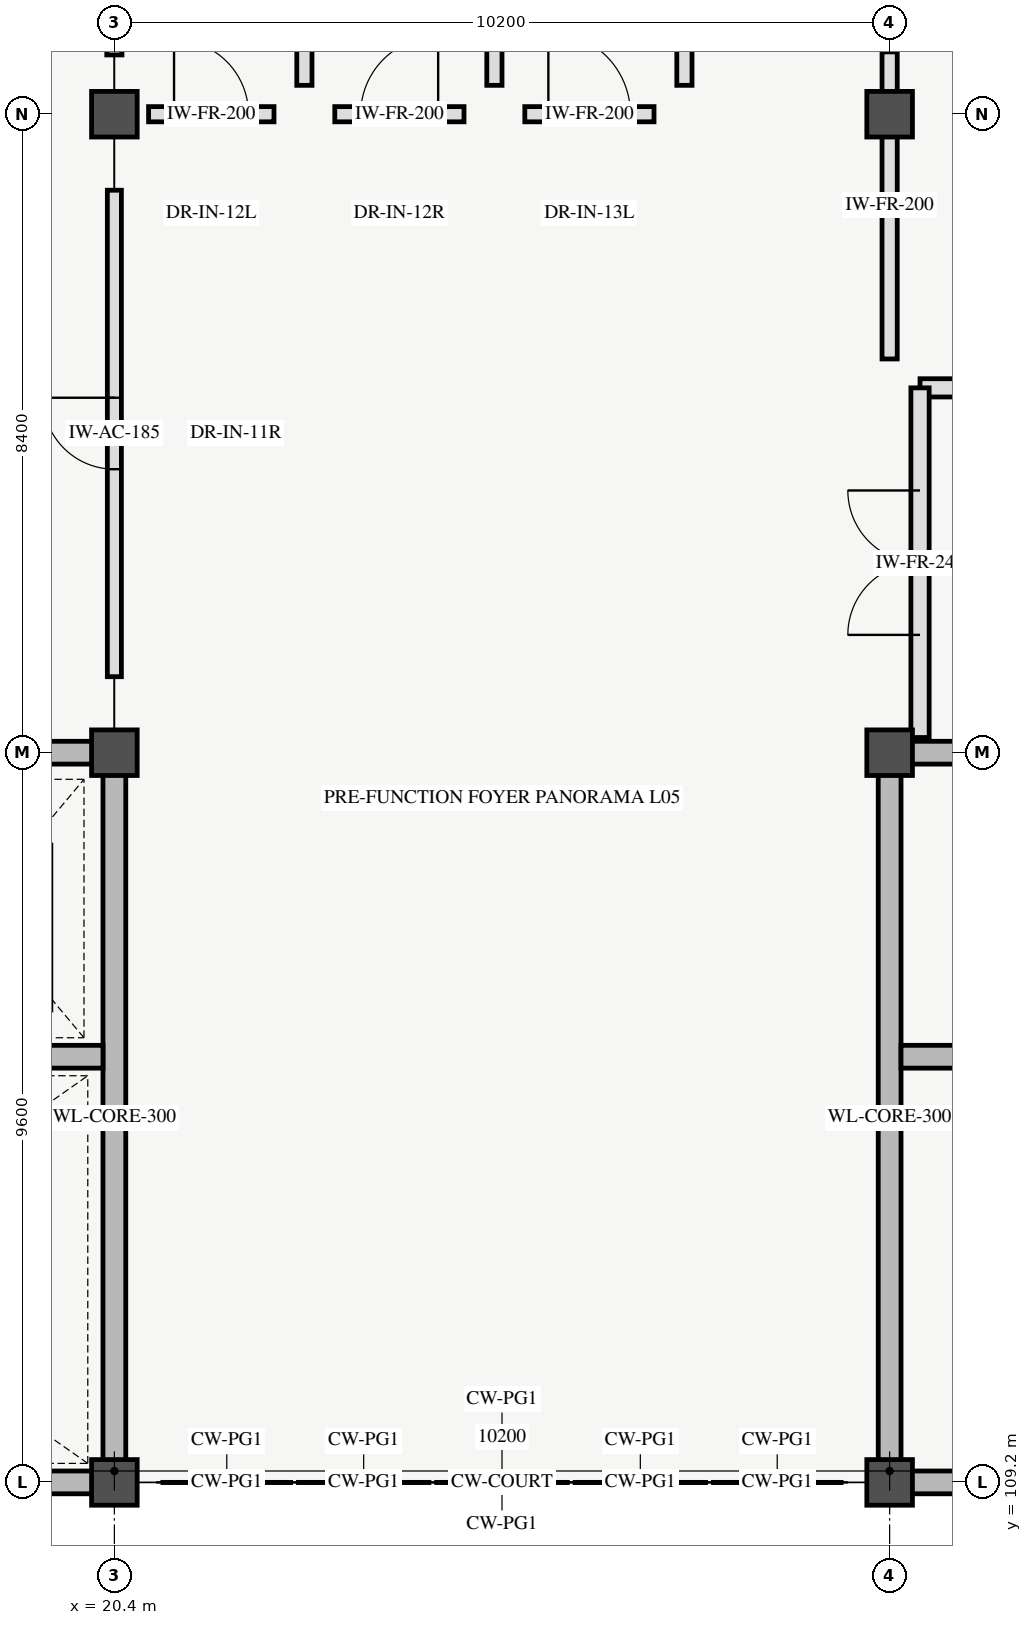
"""IFC4 building model, lengths in metres.
Left out: names, types, materials, properties, quantities, classifications, styles, units other than length and angle.
Written with IfcOpenShell. Run it as: python <this file> out.ifc"""

import sys

from ifc_helpers import new_model, si_unit, direction, frame, frame_2d, origin, origin_2d, place, context, subcontext, project, spatial, rectangle, extrude, element, fill, save


model = new_model("IFC4")
c1 = context("Model", 3, precision=1e-05, world=origin(), true_north=direction((0.0, 1.0)))
c2 = subcontext(c1, "Body", "Model", "MODEL_VIEW")
j1 = project(units=[si_unit("LENGTHUNIT", "METRE"), si_unit("PLANEANGLEUNIT", "RADIAN")], contexts=[c1])
p1 = place(None, origin())
s1 = spatial("IfcSite", under=j1, at=p1, CompositionType="ELEMENT")
p2 = place(p1, origin())
s2 = spatial("IfcBuilding", under=s1, at=p2, CompositionType="ELEMENT")
p3 = place(p2, frame((0.0, 0.0, 23.4)))
s3 = spatial("IfcBuildingStorey", under=s2, at=p3, CompositionType="ELEMENT", Elevation=23.4)
for number, where, z_axis, x_axis in (
    (1, (20.4, 109.2, 0.0), (0.0, 0.0, 1.0), (1.0, 0.0, 0.0)),
    (2, (20.4, 118.8, 0.0), (0.0, 0.0, 1.0), (1.0, 0.0, 0.0)),
    (3, (20.4, 127.2, 0.0), (0.0, 0.0, 1.0), (1.0, 0.0, 0.0)),
    (4, (30.6, 109.2, 0.0), (0.0, 0.0, 1.0), (1.0, 0.0, 0.0)),
    (5, (30.6, 118.8, 0.0), (0.0, 0.0, 1.0), (1.0, 0.0, 0.0)),
    (6, (30.6, 127.2, 0.0), (0.0, 0.0, 1.0), (1.0, 0.0, 0.0)),
):
    element("IfcColumn", number, at=place(p3, frame(where, z_axis=z_axis, x_axis=x_axis)), inside=s3, PredefinedType="COLUMN", context=c2, shape_type="SweptSolid", body=[
        extrude(rectangle(XDim=0.6, YDim=0.6, at=origin_2d()), origin(), (0.0, 0.0, 1.0), 4.2),
    ])
p4 = place(p3, frame((10.2, 109.2, 0.0), z_axis=(0.0, 0.0, 1.0), x_axis=(1.0, 0.0, 0.0)))
e7 = element("IfcWall", 7, at=p4, inside=s3, PredefinedType="SHEAR", context=c2, shape_type="SweptSolid", body=[
    extrude(rectangle(XDim=10.2, YDim=0.3, at=frame_2d((5.1, 0.0))), origin(), (0.0, 0.0, 1.0), 4.2),
])
p5 = place(p3, frame((10.2, 118.8, 0.0), z_axis=(0.0, 0.0, 1.0), x_axis=(1.0, 0.0, 0.0)))
e8 = element("IfcWall", 8, at=p5, inside=s3, PredefinedType="SHEAR", context=c2, shape_type="SweptSolid", body=[
    extrude(rectangle(XDim=10.2, YDim=0.3, at=frame_2d((5.1, 0.0))), origin(), (0.0, 0.0, 1.0), 4.2),
])
p6 = place(p5, frame((1.2, 0.0, 0.0)))
e9 = element("IfcOpeningElement", 9, at=p6, cuts=e8, PredefinedType="OPENING", context=c2, shape_type="SweptSolid", body=[
    extrude(rectangle(XDim=1.16, YDim=2.2, at=frame_2d((0.58, 1.1))), frame((0.0, 0.16, 0.0), z_axis=(0.0, -1.0, 0.0), x_axis=(1.0, 0.0, 0.0)), (0.0, 0.0, 1.0), 0.32),
])
p7 = place(p5, frame((7.4, 0.0, 0.0)))
e10 = element("IfcOpeningElement", 10, at=p7, cuts=e8, PredefinedType="OPENING", context=c2, shape_type="SweptSolid", body=[
    extrude(rectangle(XDim=1.1, YDim=2.2, at=frame_2d((0.55, 1.1))), frame((0.0, 0.16, 0.0), z_axis=(0.0, -1.0, 0.0), x_axis=(1.0, 0.0, 0.0)), (0.0, 0.0, 1.0), 0.32),
])
p8 = place(p3, frame((20.4, 109.2, 0.0), z_axis=(0.0, 0.0, 1.0), x_axis=(0.0, 1.0, 0.0)))
e11 = element("IfcWall", 11, at=p8, inside=s3, PredefinedType="SHEAR", context=c2, shape_type="SweptSolid", body=[
    extrude(rectangle(XDim=9.6, YDim=0.3, at=frame_2d((4.8, 0.0))), origin(), (0.0, 0.0, 1.0), 4.2),
])
p9 = place(p3, frame((30.6, 109.2, 0.0), z_axis=(0.0, 0.0, 1.0), x_axis=(1.0, 0.0, 0.0)))
e12 = element("IfcWall", 12, at=p9, inside=s3, PredefinedType="SHEAR", context=c2, shape_type="SweptSolid", body=[
    extrude(rectangle(XDim=10.2, YDim=0.3, at=frame_2d((5.1, 0.0))), origin(), (0.0, 0.0, 1.0), 4.2),
])
p10 = place(p3, frame((30.6, 118.8, 0.0), z_axis=(0.0, 0.0, 1.0), x_axis=(1.0, 0.0, 0.0)))
e13 = element("IfcWall", 13, at=p10, inside=s3, PredefinedType="SHEAR", context=c2, shape_type="SweptSolid", body=[
    extrude(rectangle(XDim=10.2, YDim=0.3, at=frame_2d((5.1, 0.0))), origin(), (0.0, 0.0, 1.0), 4.2),
])
p11 = place(p10, frame((1.2, 0.0, 0.0)))
e14 = element("IfcOpeningElement", 14, at=p11, cuts=e13, PredefinedType="OPENING", context=c2, shape_type="SweptSolid", body=[
    extrude(rectangle(XDim=1.16, YDim=2.2, at=frame_2d((0.58, 1.1))), frame((0.0, 0.16, 0.0), z_axis=(0.0, -1.0, 0.0), x_axis=(1.0, 0.0, 0.0)), (0.0, 0.0, 1.0), 0.32),
])
p12 = place(p10, frame((7.4, 0.0, 0.0)))
e15 = element("IfcOpeningElement", 15, at=p12, cuts=e13, PredefinedType="OPENING", context=c2, shape_type="SweptSolid", body=[
    extrude(rectangle(XDim=1.2, YDim=2.25, at=frame_2d((0.6, 1.125))), frame((0.0, 0.16, 0.0), z_axis=(0.0, -1.0, 0.0), x_axis=(1.0, 0.0, 0.0)), (0.0, 0.0, 1.0), 0.32),
])
p13 = place(p3, frame((30.6, 109.2, 0.0), z_axis=(0.0, 0.0, 1.0), x_axis=(0.0, 1.0, 0.0)))
e16 = element("IfcWall", 16, at=p13, inside=s3, PredefinedType="SHEAR", context=c2, shape_type="SweptSolid", body=[
    extrude(rectangle(XDim=9.6, YDim=0.3, at=frame_2d((4.8, 0.0))), origin(), (0.0, 0.0, 1.0), 4.2),
])
for number, where, z_axis, x_axis in (
    (17, (10.35, 114.8, 0.0), (0.0, 0.0, 1.0), (1.0, 0.0, 0.0)),
    (18, (30.75, 114.8, 0.0), (0.0, 0.0, 1.0), (1.0, 0.0, 0.0)),
):
    element("IfcWall", number, at=place(p3, frame(where, z_axis=z_axis, x_axis=x_axis)), inside=s3, PredefinedType="SHEAR", context=c2, shape_type="SweptSolid", body=[
        extrude(rectangle(XDim=9.9, YDim=0.3, at=frame_2d((4.95, 0.0))), origin(), (0.0, 0.0, 1.0), 4.2),
    ])
p14 = place(p3, frame((31.0, 123.6, 0.0), z_axis=(0.0, 0.0, 1.0), x_axis=(1.0, 0.0, 0.0)))
e19 = element("IfcWall", 19, at=p14, inside=s3, PredefinedType="PARTITIONING", context=c2, shape_type="SweptSolid", body=[
    extrude(rectangle(XDim=9.4, YDim=0.24, at=frame_2d((4.7, 0.0))), origin(), (0.0, 0.0, 1.0), 3.06),
])
p15 = place(p3, frame((31.0, 119.0, 0.0), z_axis=(0.0, 0.0, 1.0), x_axis=(0.0, 1.0, 0.0)))
e20 = element("IfcWall", 20, at=p15, inside=s3, PredefinedType="PARTITIONING", context=c2, shape_type="SweptSolid", body=[
    extrude(rectangle(XDim=4.6, YDim=0.24, at=frame_2d((2.3, 0.0))), origin(), (0.0, 0.0, 1.0), 3.06),
])
p16 = place(p15, frame((1.35, 0.0, 0.0)))
e21 = element("IfcOpeningElement", 21, at=p16, cuts=e20, PredefinedType="OPENING", context=c2, shape_type="SweptSolid", body=[
    extrude(rectangle(XDim=1.9, YDim=2.25, at=frame_2d((0.95, 1.125))), frame((0.0, 0.13, 0.0), z_axis=(0.0, -1.0, 0.0), x_axis=(1.0, 0.0, 0.0)), (0.0, 0.0, 1.0), 0.26),
])
p17 = place(p3, frame((20.4, 119.8, 0.0), z_axis=(0.0, 0.0, 1.0), x_axis=(0.0, 1.0, 0.0)))
e22 = element("IfcWall", 22, at=p17, inside=s3, PredefinedType="PARTITIONING", context=c2, shape_type="SweptSolid", body=[
    extrude(rectangle(XDim=6.4, YDim=0.185, at=frame_2d((3.2, 0.0))), origin(), (0.0, 0.0, 1.0), 3.06),
])
p18 = place(p17, frame((2.73, 0.0, 0.0)))
e23 = element("IfcOpeningElement", 23, at=p18, cuts=e22, PredefinedType="OPENING", context=c2, shape_type="SweptSolid", body=[
    extrude(rectangle(XDim=0.94, YDim=2.08, at=frame_2d((0.47, 1.04))), frame((0.0, 0.103, 0.0), z_axis=(0.0, -1.0, 0.0), x_axis=(1.0, 0.0, 0.0)), (0.0, 0.0, 1.0), 0.205),
])
p19 = place(p3, frame((20.85, 127.2, 0.0), z_axis=(0.0, 0.0, 1.0), x_axis=(1.0, 0.0, 0.0)))
e24 = element("IfcWall", 24, at=p19, inside=s3, PredefinedType="PARTITIONING", context=c2, shape_type="SweptSolid", body=[
    extrude(rectangle(XDim=1.65, YDim=0.2, at=frame_2d((0.825, 0.0))), origin(), (0.0, 0.0, 1.0), 3.06),
])
p20 = place(p19, frame((0.335, 0.0, 0.0)))
e25 = element("IfcOpeningElement", 25, at=p20, cuts=e24, PredefinedType="OPENING", context=c2, shape_type="SweptSolid", body=[
    extrude(rectangle(XDim=0.98, YDim=2.12, at=frame_2d((0.49, 1.06))), frame((0.0, 0.11, 0.0), z_axis=(0.0, -1.0, 0.0), x_axis=(1.0, 0.0, 0.0)), (0.0, 0.0, 1.0), 0.22),
])
p21 = place(p3, frame((23.3, 127.2, 0.0), z_axis=(0.0, 0.0, 1.0), x_axis=(1.0, 0.0, 0.0)))
e26 = element("IfcWall", 26, at=p21, inside=s3, PredefinedType="PARTITIONING", context=c2, shape_type="SweptSolid", body=[
    extrude(rectangle(XDim=1.7, YDim=0.2, at=frame_2d((0.85, 0.0))), origin(), (0.0, 0.0, 1.0), 3.06),
])
p22 = place(p21, frame((0.34, 0.0, 0.0)))
e27 = element("IfcOpeningElement", 27, at=p22, cuts=e26, PredefinedType="OPENING", context=c2, shape_type="SweptSolid", body=[
    extrude(rectangle(XDim=1.02, YDim=2.12, at=frame_2d((0.51, 1.06))), frame((0.0, 0.11, 0.0), z_axis=(0.0, -1.0, 0.0), x_axis=(1.0, 0.0, 0.0)), (0.0, 0.0, 1.0), 0.22),
])
p23 = place(p3, frame((25.8, 127.2, 0.0), z_axis=(0.0, 0.0, 1.0), x_axis=(1.0, 0.0, 0.0)))
e28 = element("IfcWall", 28, at=p23, inside=s3, PredefinedType="PARTITIONING", context=c2, shape_type="SweptSolid", body=[
    extrude(rectangle(XDim=1.7, YDim=0.2, at=frame_2d((0.85, 0.0))), origin(), (0.0, 0.0, 1.0), 3.06),
])
p24 = place(p23, frame((0.31, 0.0, 0.0)))
e29 = element("IfcOpeningElement", 29, at=p24, cuts=e28, PredefinedType="OPENING", context=c2, shape_type="SweptSolid", body=[
    extrude(rectangle(XDim=1.08, YDim=2.18, at=frame_2d((0.54, 1.09))), frame((0.0, 0.11, 0.0), z_axis=(0.0, -1.0, 0.0), x_axis=(1.0, 0.0, 0.0)), (0.0, 0.0, 1.0), 0.22),
])
p25 = place(p3, frame((20.4, 127.98, 0.0), z_axis=(0.0, 0.0, 1.0), x_axis=(0.0, 1.0, 0.0)))
e30 = element("IfcWall", 30, at=p25, inside=s3, PredefinedType="PARTITIONING", context=c2, shape_type="SweptSolid", body=[
    extrude(rectangle(XDim=7.24, YDim=0.2, at=frame_2d((3.62, 0.0))), origin(), (0.0, 0.0, 1.0), 3.06),
])
for number, where, z_axis, x_axis in (
    (31, (22.9, 127.58, 0.0), (0.0, 0.0, 1.0), (0.0, 1.0, 0.0)),
    (32, (25.4, 127.58, 0.0), (0.0, 0.0, 1.0), (0.0, 1.0, 0.0)),
    (33, (27.9, 127.58, 0.0), (0.0, 0.0, 1.0), (0.0, 1.0, 0.0)),
):
    element("IfcWall", number, at=place(p3, frame(where, z_axis=z_axis, x_axis=x_axis)), inside=s3, PredefinedType="PARTITIONING", context=c2, shape_type="SweptSolid", body=[
        extrude(rectangle(XDim=7.64, YDim=0.2, at=frame_2d((3.82, 0.0))), origin(), (0.0, 0.0, 1.0), 3.06),
    ])
p26 = place(p3, frame((30.6, 123.98, 0.0), z_axis=(0.0, 0.0, 1.0), x_axis=(0.0, 1.0, 0.0)))
e34 = element("IfcWall", 34, at=p26, inside=s3, PredefinedType="PARTITIONING", context=c2, shape_type="SweptSolid", body=[
    extrude(rectangle(XDim=4.04, YDim=0.2, at=frame_2d((2.02, 0.0))), origin(), (0.0, 0.0, 1.0), 3.06),
])
p27 = place(p16, origin())
e35 = element("IfcDoor", 35, at=p27, inside=s3, OperationType="DOUBLE_DOOR_SINGLE_SWING", PredefinedType="DOOR", context=c2, shape_type="SweptSolid", body=[
    extrude(rectangle(XDim=1.9, YDim=2.25, at=frame_2d((0.95, 1.125))), frame((0.0, 0.025, 0.0), z_axis=(0.0, -1.0, 0.0), x_axis=(1.0, 0.0, 0.0)), (0.0, 0.0, 1.0), 0.05),
])
fill(e21, e35)
p28 = place(p18, origin())
e36 = element("IfcDoor", 36, at=p28, inside=s3, OperationType="SINGLE_SWING_RIGHT", PredefinedType="DOOR", context=c2, shape_type="SweptSolid", body=[
    extrude(rectangle(XDim=0.94, YDim=2.08, at=frame_2d((0.47, 1.04))), frame((0.0, 0.025, 0.0), z_axis=(0.0, -1.0, 0.0), x_axis=(1.0, 0.0, 0.0)), (0.0, 0.0, 1.0), 0.05),
])
fill(e23, e36)
p29 = place(p20, origin())
e37 = element("IfcDoor", 37, at=p29, inside=s3, OperationType="SINGLE_SWING_LEFT", PredefinedType="DOOR", context=c2, shape_type="SweptSolid", body=[
    extrude(rectangle(XDim=0.98, YDim=2.12, at=frame_2d((0.49, 1.06))), frame((0.0, 0.025, 0.0), z_axis=(0.0, -1.0, 0.0), x_axis=(1.0, 0.0, 0.0)), (0.0, 0.0, 1.0), 0.05),
])
fill(e25, e37)
p30 = place(p22, origin())
e38 = element("IfcDoor", 38, at=p30, inside=s3, OperationType="SINGLE_SWING_RIGHT", PredefinedType="DOOR", context=c2, shape_type="SweptSolid", body=[
    extrude(rectangle(XDim=1.02, YDim=2.12, at=frame_2d((0.51, 1.06))), frame((0.0, 0.025, 0.0), z_axis=(0.0, -1.0, 0.0), x_axis=(1.0, 0.0, 0.0)), (0.0, 0.0, 1.0), 0.05),
])
fill(e27, e38)
p31 = place(p24, origin())
e39 = element("IfcDoor", 39, at=p31, inside=s3, OperationType="SINGLE_SWING_LEFT", PredefinedType="DOOR", context=c2, shape_type="SweptSolid", body=[
    extrude(rectangle(XDim=1.08, YDim=2.18, at=frame_2d((0.54, 1.09))), frame((0.0, 0.025, 0.0), z_axis=(0.0, -1.0, 0.0), x_axis=(1.0, 0.0, 0.0)), (0.0, 0.0, 1.0), 0.05),
])
fill(e29, e39)
save(model, sys.argv[1])
